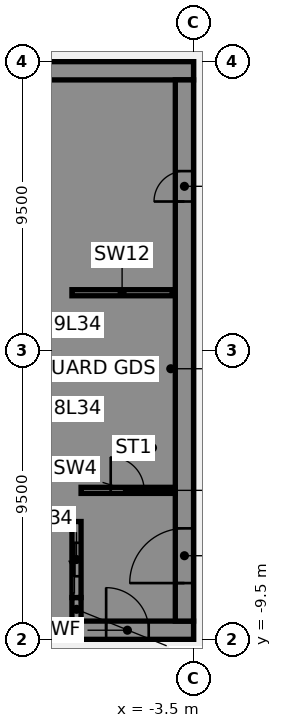
"""IFC4 building model, lengths in metres.
Left out: names, types, materials, properties, quantities, classifications, styles, units other than length and angle.
Written with IfcOpenShell. Run it as: python <this file> out.ifc"""

import sys

from ifc_helpers import new_model, si_unit, direction, frame, frame_2d, origin, place, context, subcontext, project, spatial, polyline, rectangle, outline, extrude, element, fill, save


model = new_model("IFC4")
c1 = context("Model", 3, precision=1e-05, world=origin(), true_north=direction((0.0, 1.0)))
c2 = subcontext(c1, "Body", "Model", "MODEL_VIEW")
j1 = project(units=[si_unit("LENGTHUNIT", "METRE"), si_unit("PLANEANGLEUNIT", "RADIAN")], contexts=[c1])
p1 = place(None, origin())
s1 = spatial("IfcSite", under=j1, at=p1, CompositionType="ELEMENT")
p2 = place(p1, origin())
s2 = spatial("IfcBuilding", under=s1, at=p2, CompositionType="ELEMENT")
p3 = place(p2, frame((0.0, 0.0, 140.5)))
s3 = spatial("IfcBuildingStorey", under=s2, at=p3, CompositionType="ELEMENT", Elevation=140.5)
p4 = place(p3, frame((-16.5, -9.2, 0.0), z_axis=(0.0, 0.0, 1.0), x_axis=(1.0, 0.0, 0.0)))
e1 = element("IfcWall", 1, at=p4, inside=s3, PredefinedType="SHEAR", context=c2, shape_type="SweptSolid", body=[
    extrude(rectangle(XDim=13.0, YDim=0.6, at=frame_2d((6.5, 0.0))), origin(), (0.0, 0.0, 1.0), 3.61),
])
p5 = place(p4, frame((4.15, 0.0, 0.0)))
e2 = element("IfcOpeningElement", 2, at=p5, cuts=e1, PredefinedType="OPENING", context=c2, shape_type="SweptSolid", body=[
    extrude(rectangle(XDim=1.4, YDim=2.1, at=frame_2d((0.7, 1.05))), frame((0.0, 0.31, 0.0), z_axis=(0.0, -1.0, 0.0), x_axis=(1.0, 0.0, 0.0)), (0.0, 0.0, 1.0), 0.62),
])
p6 = place(p4, frame((10.125, 0.0, 0.0)))
e3 = element("IfcOpeningElement", 3, at=p6, cuts=e1, PredefinedType="OPENING", context=c2, shape_type="SweptSolid", body=[
    extrude(rectangle(XDim=1.4, YDim=2.1, at=frame_2d((0.7, 1.05))), frame((0.0, 0.31, 0.0), z_axis=(0.0, -1.0, 0.0), x_axis=(1.0, 0.0, 0.0)), (0.0, 0.0, 1.0), 0.62),
])
p7 = place(p3, frame((-16.5, 9.2, 0.0), z_axis=(0.0, 0.0, 1.0), x_axis=(1.0, 0.0, 0.0)))
e4 = element("IfcWall", 4, at=p7, inside=s3, PredefinedType="SHEAR", context=c2, shape_type="SweptSolid", body=[
    extrude(rectangle(XDim=13.0, YDim=0.6, at=frame_2d((6.5, 0.0))), origin(), (0.0, 0.0, 1.0), 3.61),
])
p8 = place(p3, origin())
e5 = element("IfcWall", 5, at=p8, inside=s3, PredefinedType="SHEAR", context=c2, shape_type="SweptSolid", body=[
    extrude(outline(polyline([(-9.8, -5.375), (-9.8, -5.625), (-7.5, -5.625), (-7.2, -5.625), (-7.2, 8.9), (-7.5, 8.9), (-9.8, 8.9), (-9.8, 8.125), (-7.5, 8.125), (-7.5, 5.625), (-9.8, 5.625), (-9.8, 5.375), (-7.5, 5.375), (-7.5, 2.875), (-9.8, 2.875), (-9.8, 2.625), (-7.5, 2.625), (-7.5, 0.125), (-9.8, 0.125), (-9.8, -0.125), (-7.5, -0.125), (-7.5, -2.625), (-9.8, -2.625), (-9.8, -2.875), (-7.5, -2.875), (-7.5, -5.375), (-9.8, -5.375)])), origin(), (0.0, 0.0, 1.0), 3.61),
])
p9 = place(p3, origin())
e6 = element("IfcWall", 6, at=p9, inside=s3, PredefinedType="SHEAR", context=c2, shape_type="SweptSolid", body=[
    extrude(outline(polyline([(-7.5, -8.125), (-9.55, -8.125), (-9.55, -5.625), (-9.8, -5.625), (-9.8, -8.125), (-9.8, -8.9), (-7.5, -8.9), (-7.5, -8.125)])), origin(), (0.0, 0.0, 1.0), 3.61),
])
p10 = place(p3, frame((-7.35, -8.9, 0.0), z_axis=(0.0, 0.0, 1.0), x_axis=(0.0, 1.0, 0.0)))
e7 = element("IfcWall", 7, at=p10, inside=s3, PredefinedType="SHEAR", context=c2, shape_type="SweptSolid", body=[
    extrude(rectangle(XDim=0.775, YDim=0.3, at=frame_2d((0.387, 0.0))), origin(), (0.0, 0.0, 1.0), 3.61),
])
p11 = place(p3, frame((-7.5, 1.9, 0.0), z_axis=(0.0, 0.0, 1.0), x_axis=(1.0, 0.0, 0.0)))
e8 = element("IfcWall", 8, at=p11, inside=s3, PredefinedType="SHEAR", context=c2, shape_type="SweptSolid", body=[
    extrude(rectangle(XDim=3.3, YDim=0.2, at=frame_2d((1.65, 0.0))), origin(), (0.0, 0.0, 1.0), 3.61),
])
p12 = place(p3, frame((-7.35, -8.125, 0.0), z_axis=(0.0, 0.0, 1.0), x_axis=(0.0, 1.0, 0.0)))
e9 = element("IfcWall", 9, at=p12, inside=s3, PredefinedType="SHEAR", context=c2, shape_type="SweptSolid", body=[
    extrude(rectangle(XDim=2.5, YDim=0.3, at=frame_2d((1.25, 0.0))), origin(), (0.0, 0.0, 1.0), 3.61),
])
p13 = place(p12, frame((0.7, 0.0, 0.0)))
e10 = element("IfcOpeningElement", 10, at=p13, cuts=e9, PredefinedType="OPENING", context=c2, shape_type="SweptSolid", body=[
    extrude(rectangle(XDim=1.1, YDim=2.1, at=frame_2d((0.55, 1.05))), frame((0.0, 0.16, 0.0), z_axis=(0.0, -1.0, 0.0), x_axis=(1.0, 0.0, 0.0)), (0.0, 0.0, 1.0), 0.32),
])
p14 = place(p3, frame((-3.8, -8.9, 0.0), z_axis=(0.0, 0.0, 1.0), x_axis=(0.0, 1.0, 0.0)))
e11 = element("IfcWall", 11, at=p14, inside=s3, PredefinedType="SHEAR", context=c2, shape_type="SweptSolid", body=[
    extrude(rectangle(XDim=17.8, YDim=0.6, at=frame_2d((8.9, 0.0))), origin(), (0.0, 0.0, 1.0), 3.61),
])
p15 = place(p14, frame((1.25, 0.0, 0.0)))
e12 = element("IfcOpeningElement", 12, at=p15, cuts=e11, PredefinedType="OPENING", context=c2, shape_type="SweptSolid", body=[
    extrude(rectangle(XDim=1.8, YDim=2.1, at=frame_2d((0.9, 1.05))), frame((0.0, 0.31, 0.0), z_axis=(0.0, -1.0, 0.0), x_axis=(1.0, 0.0, 0.0)), (0.0, 0.0, 1.0), 0.62),
])
p16 = place(p14, frame((13.8, 0.0, 0.0)))
e13 = element("IfcOpeningElement", 13, at=p16, cuts=e11, PredefinedType="OPENING", context=c2, shape_type="SweptSolid", body=[
    extrude(rectangle(XDim=1.0, YDim=2.1, at=frame_2d((0.5, 1.05))), frame((0.0, 0.31, 0.0), z_axis=(0.0, -1.0, 0.0), x_axis=(1.0, 0.0, 0.0)), (0.0, 0.0, 1.0), 0.62),
])
p17 = place(p3, frame((-7.2, -4.6, 0.0), z_axis=(0.0, 0.0, 1.0), x_axis=(1.0, 0.0, 0.0)))
e14 = element("IfcWall", 14, at=p17, inside=s3, PredefinedType="SHEAR", context=c2, shape_type="SweptSolid", body=[
    extrude(rectangle(XDim=3.1, YDim=0.2, at=frame_2d((1.55, 0.0))), origin(), (0.0, 0.0, 1.0), 3.61),
])
p18 = place(p17, frame((0.975, 0.0, 0.0)))
e15 = element("IfcOpeningElement", 15, at=p18, cuts=e14, PredefinedType="OPENING", context=c2, shape_type="SweptSolid", body=[
    extrude(rectangle(XDim=1.1, YDim=2.1, at=frame_2d((0.55, 1.05))), frame((0.0, 0.11, 0.0), z_axis=(0.0, -1.0, 0.0), x_axis=(1.0, 0.0, 0.0)), (0.0, 0.0, 1.0), 0.22),
])
p19 = place(p6, origin())
e16 = element("IfcDoor", 16, at=p19, inside=s3, OperationType="SINGLE_SWING_LEFT", PredefinedType="DOOR", context=c2, shape_type="SweptSolid", body=[
    extrude(rectangle(XDim=1.4, YDim=2.1, at=frame_2d((0.7, 1.05))), frame((0.0, 0.025, 0.0), z_axis=(0.0, -1.0, 0.0), x_axis=(1.0, 0.0, 0.0)), (0.0, 0.0, 1.0), 0.05),
])
fill(e3, e16)
p20 = place(p15, origin())
e17 = element("IfcDoor", 17, at=p20, inside=s3, OperationType="SINGLE_SWING_LEFT", PredefinedType="DOOR", context=c2, shape_type="SweptSolid", body=[
    extrude(rectangle(XDim=1.8, YDim=2.1, at=frame_2d((0.9, 1.05))), frame((0.0, 0.025, 0.0), z_axis=(0.0, -1.0, 0.0), x_axis=(1.0, 0.0, 0.0)), (0.0, 0.0, 1.0), 0.05),
])
fill(e12, e17)
p21 = place(p16, origin())
e18 = element("IfcDoor", 18, at=p21, inside=s3, OperationType="SINGLE_SWING_LEFT", PredefinedType="DOOR", context=c2, shape_type="SweptSolid", body=[
    extrude(rectangle(XDim=1.0, YDim=2.1, at=frame_2d((0.5, 1.05))), frame((0.0, 0.025, 0.0), z_axis=(0.0, -1.0, 0.0), x_axis=(1.0, 0.0, 0.0)), (0.0, 0.0, 1.0), 0.05),
])
fill(e13, e18)
p22 = place(p18, origin())
e19 = element("IfcDoor", 19, at=p22, inside=s3, OperationType="SINGLE_SWING_LEFT", PredefinedType="DOOR", context=c2, shape_type="SweptSolid", body=[
    extrude(rectangle(XDim=1.1, YDim=2.1, at=frame_2d((0.55, 1.05))), frame((0.0, 0.025, 0.0), z_axis=(0.0, -1.0, 0.0), x_axis=(1.0, 0.0, 0.0)), (0.0, 0.0, 1.0), 0.05),
])
fill(e15, e19)
p23 = place(p13, origin())
e20 = element("IfcDoor", 20, at=p23, inside=s3, OperationType="SLIDING_TO_LEFT", PredefinedType="DOOR", context=c2, shape_type="SweptSolid", body=[
    extrude(rectangle(XDim=1.1, YDim=2.1, at=frame_2d((0.55, 1.05))), frame((0.0, 0.025, 0.0), z_axis=(0.0, -1.0, 0.0), x_axis=(1.0, 0.0, 0.0)), (0.0, 0.0, 1.0), 0.05),
])
fill(e10, e20)
save(model, sys.argv[1])
